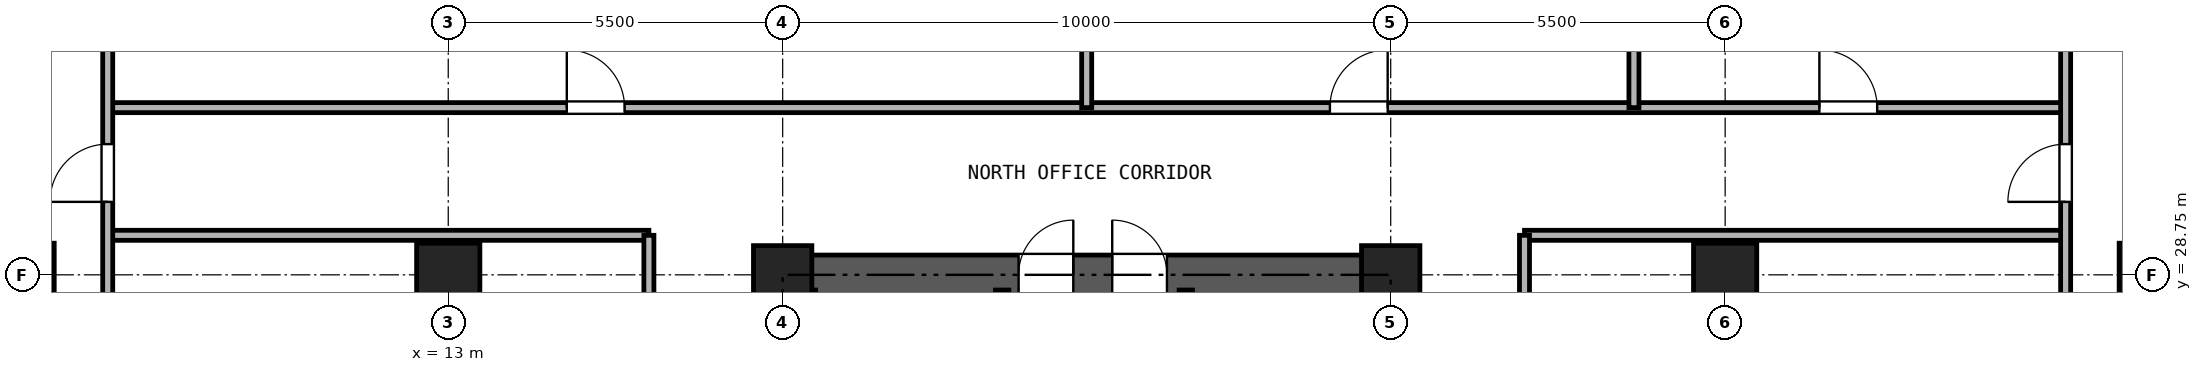
"""IFC4 building model, lengths in metres.
Left out: names, types, materials, properties, quantities, classifications, styles, units other than length and angle.
Written with IfcOpenShell. Run it as: python <this file> out.ifc"""

import sys

from ifc_helpers import new_model, si_unit, direction, frame, frame_2d, origin, origin_2d, place, context, subcontext, project, spatial, rectangle, hollow_rectangle, extrude, source, transform, mapped, element, fill, save


model = new_model("IFC4")
c1 = context("Model", 3, precision=1e-05, world=origin(), true_north=direction((0.0, 1.0)))
c2 = subcontext(c1, "Body", "Model", "MODEL_VIEW")
j1 = project(units=[si_unit("LENGTHUNIT", "METRE"), si_unit("PLANEANGLEUNIT", "RADIAN")], contexts=[c1])
p1 = place(None, origin())
s1 = spatial("IfcSite", under=j1, at=p1, CompositionType="ELEMENT")
p2 = place(p1, origin())
s2 = spatial("IfcBuilding", under=s1, at=p2, CompositionType="ELEMENT")
p3 = place(p2, frame((0.0, 0.0, 36.9)))
s3 = spatial("IfcBuildingStorey", under=s2, at=p3, CompositionType="ELEMENT", Elevation=36.9)
m1 = source(origin(), c2, "Body", "SweptSolid", [
    extrude(hollow_rectangle(XDim=1.04, YDim=1.04, WallThickness=0.065, at=origin_2d()), origin(), (0.0, 0.0, 1.0), 3.32),
])
for number, where, z_axis, x_axis in (
    (1, (6.0, 28.75, 0.0), (0.0, 0.0, 1.0), (1.0, 0.0, 0.0)),
    (2, (13.0, 28.75, 0.0), (0.0, 0.0, 1.0), (1.0, 0.0, 0.0)),
):
    element("IfcColumn", number, at=place(p3, frame(where, z_axis=z_axis, x_axis=x_axis)), inside=s3, PredefinedType="COLUMN", context=c2, shape_type="MappedRepresentation", body=[
        mapped(m1, transform((0.0, 0.0, 0.0), x_axis=(1.0, 0.0, 0.0), y_axis=(0.0, 1.0, 0.0), z_axis=(0.0, 0.0, 1.0), scale=1.0)),
    ])
m2 = source(origin(), c2, "Body", "SweptSolid", [
    extrude(hollow_rectangle(XDim=0.96, YDim=0.96, WallThickness=0.06, at=origin_2d()), origin(), (0.0, 0.0, 1.0), 3.32),
])
for number, where, z_axis, x_axis in (
    (3, (18.5, 28.75, 0.0), (0.0, 0.0, 1.0), (1.0, 0.0, 0.0)),
    (4, (28.5, 28.75, 0.0), (0.0, 0.0, 1.0), (1.0, 0.0, 0.0)),
):
    element("IfcColumn", number, at=place(p3, frame(where, z_axis=z_axis, x_axis=x_axis)), inside=s3, PredefinedType="COLUMN", context=c2, shape_type="MappedRepresentation", body=[
        mapped(m2, transform((0.0, 0.0, 0.0), x_axis=(1.0, 0.0, 0.0), y_axis=(0.0, 1.0, 0.0), z_axis=(0.0, 0.0, 1.0), scale=1.0)),
    ])
for number, where, z_axis, x_axis in (
    (5, (34.0, 28.75, 0.0), (0.0, 0.0, 1.0), (1.0, 0.0, 0.0)),
    (6, (41.0, 28.75, 0.0), (0.0, 0.0, 1.0), (1.0, 0.0, 0.0)),
):
    element("IfcColumn", number, at=place(p3, frame(where, z_axis=z_axis, x_axis=x_axis)), inside=s3, PredefinedType="COLUMN", context=c2, shape_type="MappedRepresentation", body=[
        mapped(m1, transform((0.0, 0.0, 0.0), x_axis=(1.0, 0.0, 0.0), y_axis=(0.0, 1.0, 0.0), z_axis=(0.0, 0.0, 1.0), scale=1.0)),
    ])
p4 = place(p3, frame((18.175, 28.75, 0.0), z_axis=(0.0, 0.0, 1.0), x_axis=(1.0, 0.0, 0.0)))
e7 = element("IfcWall", 7, at=p4, inside=s3, PredefinedType="SHEAR", context=c2, shape_type="SweptSolid", body=[
    extrude(rectangle(XDim=10.65, YDim=0.65, at=frame_2d((5.325, 0.0))), origin(), (0.0, 0.0, 1.0), 3.32),
])
p5 = place(p4, frame((4.205, 0.0, 0.0)))
e8 = element("IfcOpeningElement", 8, at=p5, cuts=e7, PredefinedType="OPENING", context=c2, shape_type="SweptSolid", body=[
    extrude(rectangle(XDim=0.9, YDim=2.05, at=frame_2d((0.45, 1.025))), frame((0.0, 0.335, 0.0), z_axis=(0.0, -1.0, 0.0), x_axis=(1.0, 0.0, 0.0)), (0.0, 0.0, 1.0), 0.67),
])
p6 = place(p4, frame((5.745, 0.0, 0.0)))
e9 = element("IfcOpeningElement", 9, at=p6, cuts=e7, PredefinedType="OPENING", context=c2, shape_type="SweptSolid", body=[
    extrude(rectangle(XDim=0.9, YDim=2.05, at=frame_2d((0.45, 1.025))), frame((0.0, 0.335, 0.0), z_axis=(0.0, -1.0, 0.0), x_axis=(1.0, 0.0, 0.0)), (0.0, 0.0, 1.0), 0.67),
])
for number, where, z_axis, x_axis in (
    (10, (18.93, 21.39, 0.0), (0.0, 0.0, 1.0), (0.0, 1.0, 0.0)),
    (11, (22.11, 21.39, 0.0), (0.0, 0.0, 1.0), (0.0, 1.0, 0.0)),
    (12, (25.13, 21.39, 0.0), (0.0, 0.0, 1.0), (0.0, 1.0, 0.0)),
):
    element("IfcWall", number, at=place(p3, frame(where, z_axis=z_axis, x_axis=x_axis)), inside=s3, PredefinedType="SOLIDWALL", context=c2, shape_type="SweptSolid", body=[
        extrude(rectangle(XDim=7.11, YDim=0.22, at=frame_2d((3.555, 0.0))), origin(), (0.0, 0.0, 1.0), 3.32),
    ])
p7 = place(p3, frame((7.4, 31.5, 0.0), z_axis=(0.0, 0.0, 1.0), x_axis=(1.0, 0.0, 0.0)))
e13 = element("IfcWall", 13, at=p7, inside=s3, PredefinedType="PARTITIONING", context=c2, shape_type="SweptSolid", body=[
    extrude(rectangle(XDim=32.2, YDim=0.165, at=frame_2d((16.1, 0.0))), origin(), (0.0, 0.0, 1.0), 2.898),
])
p8 = place(p7, frame((7.55, 0.0, 0.0)))
e14 = element("IfcOpeningElement", 14, at=p8, cuts=e13, PredefinedType="OPENING", context=c2, shape_type="SweptSolid", body=[
    extrude(rectangle(XDim=0.95, YDim=2.15, at=frame_2d((0.475, 1.075))), frame((0.0, 0.093, 0.0), z_axis=(0.0, -1.0, 0.0), x_axis=(1.0, 0.0, 0.0)), (0.0, 0.0, 1.0), 0.185),
])
p9 = place(p7, frame((20.1, 0.0, 0.0)))
e15 = element("IfcOpeningElement", 15, at=p9, cuts=e13, PredefinedType="OPENING", context=c2, shape_type="SweptSolid", body=[
    extrude(rectangle(XDim=0.95, YDim=2.15, at=frame_2d((0.475, 1.075))), frame((0.0, 0.093, 0.0), z_axis=(0.0, -1.0, 0.0), x_axis=(1.0, 0.0, 0.0)), (0.0, 0.0, 1.0), 0.185),
])
p10 = place(p7, frame((28.15, 0.0, 0.0)))
e16 = element("IfcOpeningElement", 16, at=p10, cuts=e13, PredefinedType="OPENING", context=c2, shape_type="SweptSolid", body=[
    extrude(rectangle(XDim=0.95, YDim=2.15, at=frame_2d((0.475, 1.075))), frame((0.0, 0.093, 0.0), z_axis=(0.0, -1.0, 0.0), x_axis=(1.0, 0.0, 0.0)), (0.0, 0.0, 1.0), 0.185),
])
for number, where, z_axis, x_axis in (
    (17, (7.4, 29.4, 0.0), (0.0, 0.0, 1.0), (1.0, 0.0, 0.0)),
    (18, (30.7, 29.4, 0.0), (0.0, 0.0, 1.0), (1.0, 0.0, 0.0)),
):
    element("IfcWall", number, at=place(p3, frame(where, z_axis=z_axis, x_axis=x_axis)), inside=s3, PredefinedType="PARTITIONING", context=c2, shape_type="SweptSolid", body=[
        extrude(rectangle(XDim=8.9, YDim=0.165, at=frame_2d((4.45, 0.0))), origin(), (0.0, 0.0, 1.0), 3.32),
    ])
p11 = place(p3, frame((16.3, 11.15, 0.0), z_axis=(0.0, 0.0, 1.0), x_axis=(0.0, 1.0, 0.0)))
e19 = element("IfcWall", 19, at=p11, inside=s3, PredefinedType="PARTITIONING", context=c2, shape_type="SweptSolid", body=[
    extrude(rectangle(XDim=18.25, YDim=0.165, at=frame_2d((9.125, 0.0))), origin(), (0.0, 0.0, 1.0), 3.32),
])
p12 = place(p11, frame((5.409, 0.0, 0.0)))
e20 = element("IfcOpeningElement", 20, at=p12, cuts=e19, PredefinedType="OPENING", context=c2, shape_type="SweptSolid", body=[
    extrude(rectangle(XDim=0.95, YDim=2.15, at=frame_2d((0.475, 1.075))), frame((0.0, 0.093, 0.0), z_axis=(0.0, -1.0, 0.0), x_axis=(1.0, 0.0, 0.0)), (0.0, 0.0, 1.0), 0.185),
])
p13 = place(p11, frame((14.534, 0.0, 0.0)))
e21 = element("IfcOpeningElement", 21, at=p13, cuts=e19, PredefinedType="OPENING", context=c2, shape_type="SweptSolid", body=[
    extrude(rectangle(XDim=0.95, YDim=2.15, at=frame_2d((0.475, 1.075))), frame((0.0, 0.093, 0.0), z_axis=(0.0, -1.0, 0.0), x_axis=(1.0, 0.0, 0.0)), (0.0, 0.0, 1.0), 0.185),
])
p14 = place(p3, frame((30.7, 11.15, 0.0), z_axis=(0.0, 0.0, 1.0), x_axis=(0.0, 1.0, 0.0)))
e22 = element("IfcWall", 22, at=p14, inside=s3, PredefinedType="PARTITIONING", context=c2, shape_type="SweptSolid", body=[
    extrude(rectangle(XDim=18.25, YDim=0.165, at=frame_2d((9.125, 0.0))), origin(), (0.0, 0.0, 1.0), 3.32),
])
p15 = place(p14, frame((8.625, 0.0, 0.0)))
e23 = element("IfcOpeningElement", 23, at=p15, cuts=e22, PredefinedType="OPENING", context=c2, shape_type="SweptSolid", body=[
    extrude(rectangle(XDim=0.95, YDim=2.15, at=frame_2d((0.475, 1.075))), frame((0.0, 0.093, 0.0), z_axis=(0.0, -1.0, 0.0), x_axis=(1.0, 0.0, 0.0)), (0.0, 0.0, 1.0), 0.185),
])
p16 = place(p3, frame((7.4, 0.16, 0.0), z_axis=(0.0, 0.0, 1.0), x_axis=(0.0, 1.0, 0.0)))
e24 = element("IfcWall", 24, at=p16, inside=s3, PredefinedType="PARTITIONING", context=c2, shape_type="SweptSolid", body=[
    extrude(rectangle(XDim=40.18, YDim=0.165, at=frame_2d((20.09, 0.0))), origin(), (0.0, 0.0, 1.0), 3.32),
])
p17 = place(p16, frame((9.44, 0.0, 0.0)))
e25 = element("IfcOpeningElement", 25, at=p17, cuts=e24, PredefinedType="OPENING", context=c2, shape_type="SweptSolid", body=[
    extrude(rectangle(XDim=0.95, YDim=2.15, at=frame_2d((0.475, 1.075))), frame((0.0, 0.093, 0.0), z_axis=(0.0, -1.0, 0.0), x_axis=(1.0, 0.0, 0.0)), (0.0, 0.0, 1.0), 0.185),
])
p18 = place(p16, frame((29.79, 0.0, 0.0)))
e26 = element("IfcOpeningElement", 26, at=p18, cuts=e24, PredefinedType="OPENING", context=c2, shape_type="SweptSolid", body=[
    extrude(rectangle(XDim=0.95, YDim=2.15, at=frame_2d((0.475, 1.075))), frame((0.0, 0.093, 0.0), z_axis=(0.0, -1.0, 0.0), x_axis=(1.0, 0.0, 0.0)), (0.0, 0.0, 1.0), 0.185),
])
p19 = place(p3, frame((39.6, 0.16, 0.0), z_axis=(0.0, 0.0, 1.0), x_axis=(0.0, 1.0, 0.0)))
e27 = element("IfcWall", 27, at=p19, inside=s3, PredefinedType="PARTITIONING", context=c2, shape_type="SweptSolid", body=[
    extrude(rectangle(XDim=40.18, YDim=0.165, at=frame_2d((20.09, 0.0))), origin(), (0.0, 0.0, 1.0), 3.32),
])
p20 = place(p19, frame((9.44, 0.0, 0.0)))
e28 = element("IfcOpeningElement", 28, at=p20, cuts=e27, PredefinedType="OPENING", context=c2, shape_type="SweptSolid", body=[
    extrude(rectangle(XDim=0.95, YDim=2.15, at=frame_2d((0.475, 1.075))), frame((0.0, 0.093, 0.0), z_axis=(0.0, -1.0, 0.0), x_axis=(1.0, 0.0, 0.0)), (0.0, 0.0, 1.0), 0.185),
])
p21 = place(p19, frame((29.79, 0.0, 0.0)))
e29 = element("IfcOpeningElement", 29, at=p21, cuts=e27, PredefinedType="OPENING", context=c2, shape_type="SweptSolid", body=[
    extrude(rectangle(XDim=0.95, YDim=2.15, at=frame_2d((0.475, 1.075))), frame((0.0, 0.093, 0.0), z_axis=(0.0, -1.0, 0.0), x_axis=(1.0, 0.0, 0.0)), (0.0, 0.0, 1.0), 0.185),
])
for number, where, z_axis, x_axis in (
    (30, (23.5, 31.5, 0.0), (0.0, 0.0, 1.0), (0.0, 1.0, 0.0)),
    (31, (32.5, 31.5, 0.0), (0.0, 0.0, 1.0), (0.0, 1.0, 0.0)),
):
    element("IfcWall", number, at=place(p3, frame(where, z_axis=z_axis, x_axis=x_axis)), inside=s3, PredefinedType="PARTITIONING", context=c2, shape_type="SweptSolid", body=[
        extrude(rectangle(XDim=8.84, YDim=0.165, at=frame_2d((4.42, 0.0))), origin(), (0.0, 0.0, 1.0), 3.32),
    ])
p22 = place(p5, origin())
e32 = element("IfcDoor", 32, at=p22, inside=s3, OperationType="SINGLE_SWING_RIGHT", PredefinedType="DOOR", context=c2, shape_type="SweptSolid", body=[
    extrude(rectangle(XDim=0.9, YDim=2.05, at=frame_2d((0.45, 1.025))), frame((0.0, 0.025, 0.0), z_axis=(0.0, -1.0, 0.0), x_axis=(1.0, 0.0, 0.0)), (0.0, 0.0, 1.0), 0.05),
])
fill(e8, e32)
p23 = place(p6, origin())
e33 = element("IfcDoor", 33, at=p23, inside=s3, OperationType="SINGLE_SWING_LEFT", PredefinedType="DOOR", context=c2, shape_type="SweptSolid", body=[
    extrude(rectangle(XDim=0.9, YDim=2.05, at=frame_2d((0.45, 1.025))), frame((0.0, 0.025, 0.0), z_axis=(0.0, -1.0, 0.0), x_axis=(1.0, 0.0, 0.0)), (0.0, 0.0, 1.0), 0.05),
])
fill(e9, e33)
p24 = place(p8, origin())
e34 = element("IfcDoor", 34, at=p24, inside=s3, OperationType="SINGLE_SWING_LEFT", PredefinedType="DOOR", context=c2, shape_type="SweptSolid", body=[
    extrude(rectangle(XDim=0.95, YDim=2.15, at=frame_2d((0.475, 1.075))), frame((0.0, 0.025, 0.0), z_axis=(0.0, -1.0, 0.0), x_axis=(1.0, 0.0, 0.0)), (0.0, 0.0, 1.0), 0.05),
])
fill(e14, e34)
p25 = place(p9, origin())
e35 = element("IfcDoor", 35, at=p25, inside=s3, OperationType="SINGLE_SWING_RIGHT", PredefinedType="DOOR", context=c2, shape_type="SweptSolid", body=[
    extrude(rectangle(XDim=0.95, YDim=2.15, at=frame_2d((0.475, 1.075))), frame((0.0, 0.025, 0.0), z_axis=(0.0, -1.0, 0.0), x_axis=(1.0, 0.0, 0.0)), (0.0, 0.0, 1.0), 0.05),
])
fill(e15, e35)
p26 = place(p10, origin())
e36 = element("IfcDoor", 36, at=p26, inside=s3, OperationType="SINGLE_SWING_LEFT", PredefinedType="DOOR", context=c2, shape_type="SweptSolid", body=[
    extrude(rectangle(XDim=0.95, YDim=2.15, at=frame_2d((0.475, 1.075))), frame((0.0, 0.025, 0.0), z_axis=(0.0, -1.0, 0.0), x_axis=(1.0, 0.0, 0.0)), (0.0, 0.0, 1.0), 0.05),
])
fill(e16, e36)
p27 = place(p18, frame((0.95, 0.0, 0.0), z_axis=(0.0, 0.0, 1.0), x_axis=(-1.0, 0.0, 0.0)))
e37 = element("IfcDoor", 37, at=p27, inside=s3, OperationType="SINGLE_SWING_LEFT", PredefinedType="DOOR", context=c2, shape_type="SweptSolid", body=[
    extrude(rectangle(XDim=0.95, YDim=2.15, at=frame_2d((0.475, 1.075))), frame((0.0, 0.025, 0.0), z_axis=(0.0, -1.0, 0.0), x_axis=(1.0, 0.0, 0.0)), (0.0, 0.0, 1.0), 0.05),
])
fill(e26, e37)
p28 = place(p21, origin())
e38 = element("IfcDoor", 38, at=p28, inside=s3, OperationType="SINGLE_SWING_LEFT", PredefinedType="DOOR", context=c2, shape_type="SweptSolid", body=[
    extrude(rectangle(XDim=0.95, YDim=2.15, at=frame_2d((0.475, 1.075))), frame((0.0, 0.025, 0.0), z_axis=(0.0, -1.0, 0.0), x_axis=(1.0, 0.0, 0.0)), (0.0, 0.0, 1.0), 0.05),
])
fill(e29, e38)
save(model, sys.argv[1])
